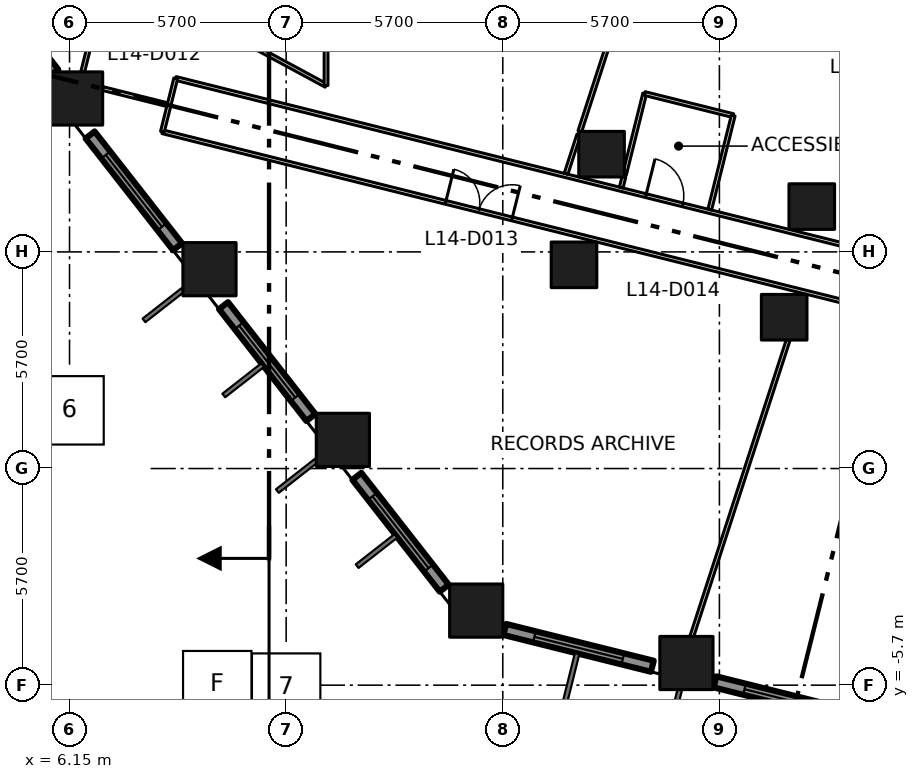
"""IFC4 building model, lengths in metres.
Left out: names, types, materials, properties, quantities, classifications, styles, units other than length and angle.
Written with IfcOpenShell. Run it as: python <this file> out.ifc"""

import sys

from ifc_helpers import new_model, si_unit, direction, frame, frame_2d, origin, origin_2d, place, context, subcontext, project, spatial, rectangle, extrude, element, fill, save


model = new_model("IFC4")
c1 = context("Model", 3, precision=1e-05, world=origin(), true_north=direction((0.0, 1.0)))
c2 = subcontext(c1, "Body", "Model", "MODEL_VIEW")
j1 = project(units=[si_unit("LENGTHUNIT", "METRE"), si_unit("PLANEANGLEUNIT", "RADIAN")], contexts=[c1])
p1 = place(None, origin())
s1 = spatial("IfcSite", under=j1, at=p1, CompositionType="ELEMENT")
p2 = place(p1, origin())
s2 = spatial("IfcBuilding", under=s1, at=p2, CompositionType="ELEMENT")
p3 = place(p2, frame((0.0, 0.0, 66.6)))
s3 = spatial("IfcBuildingStorey", under=s2, at=p3, CompositionType="ELEMENT", Elevation=66.6)
for number, where, z_axis, x_axis in (
    (1, (16.851, -3.738, 0.0), (0.0, 0.0, 1.0), (1.0, 0.0, 0.0)),
    (2, (13.342, 0.754, 0.0), (0.0, 0.0, 1.0), (1.0, 0.0, 0.0)),
    (3, (9.833, 5.245, 0.0), (0.0, 0.0, 1.0), (1.0, 0.0, 0.0)),
    (4, (6.323, 9.737, 0.0), (0.0, 0.0, 1.0), (1.0, 0.0, 0.0)),
    (5, (22.382, -5.117, 0.0), (0.0, 0.0, 1.0), (1.0, 0.0, 0.0)),
):
    element("IfcColumn", number, at=place(p3, frame(where, z_axis=z_axis, x_axis=x_axis)), inside=s3, PredefinedType="COLUMN", context=c2, shape_type="SweptSolid", body=[
        extrude(rectangle(XDim=1.4, YDim=1.4, at=origin_2d()), origin(), (0.0, 0.0, 1.0), 4.2),
    ])
for number, where, z_axis, x_axis in (
    (6, (19.424, 5.36, 0.0), (0.0, 0.0, 1.0), (1.0, 0.0, 0.0)),
    (7, (24.954, 3.981, 0.0), (0.0, 0.0, 1.0), (1.0, 0.0, 0.0)),
    (8, (20.149, 8.271, 0.0), (0.0, 0.0, 1.0), (1.0, 0.0, 0.0)),
    (9, (25.68, 6.892, 0.0), (0.0, 0.0, 1.0), (1.0, 0.0, 0.0)),
):
    element("IfcColumn", number, at=place(p3, frame(where, z_axis=z_axis, x_axis=x_axis)), inside=s3, PredefinedType="COLUMN", context=c2, shape_type="SweptSolid", body=[
        extrude(rectangle(XDim=1.2, YDim=1.2, at=origin_2d()), origin(), (0.0, 0.0, 1.0), 4.2),
    ])
p4 = place(p3, frame((3.361, 13.529, 0.0), z_axis=(0.0, 0.0, 1.0), x_axis=(0.615507574125, -0.788130970204, 0.0)))
e10 = element("IfcWall", 10, at=p4, inside=s3, PredefinedType="SOLIDWALL", context=c2, shape_type="SweptSolid", body=[
    extrude(rectangle(XDim=3.923, YDim=0.2, at=frame_2d((1.962, 0.0))), origin(), (0.0, 0.0, 1.0), 3.1),
])
p5 = place(p4, frame((1.061, 0.0, 0.0)))
e11 = element("IfcOpeningElement", 11, at=p5, cuts=e10, PredefinedType="OPENING", context=c2, shape_type="SweptSolid", body=[
    extrude(rectangle(XDim=1.8, YDim=2.9, at=frame_2d((0.9, 1.45))), frame((0.0, 0.11, 0.0), z_axis=(0.0, -1.0, 0.0), x_axis=(1.0, 0.0, 0.0)), (0.0, 0.0, 1.0), 0.22),
])
p6 = place(p3, frame((6.692, 8.778, 0.0), z_axis=(0.0, 0.0, 1.0), x_axis=(0.615767067156, -0.787928244833, 0.0)))
e12 = element("IfcWall", 12, at=p6, inside=s3, PredefinedType="SOLIDWALL", context=c2, shape_type="SweptSolid", body=[
    extrude(rectangle(XDim=3.735, YDim=0.3, at=frame_2d((1.868, 0.0))), origin(), (0.0, 0.0, 1.0), 3.1),
])
p7 = place(p6, frame((0.668, 0.0, 0.8)))
e13 = element("IfcOpeningElement", 13, at=p7, cuts=e12, PredefinedType="OPENING", context=c2, shape_type="SweptSolid", body=[
    extrude(rectangle(XDim=2.4, YDim=2.1, at=frame_2d((1.2, 1.05))), frame((0.0, 0.16, 0.0), z_axis=(0.0, -1.0, 0.0), x_axis=(1.0, 0.0, 0.0)), (0.0, 0.0, 1.0), 0.32),
])
p8 = place(p3, frame((10.202, 4.286, 0.0), z_axis=(0.0, 0.0, 1.0), x_axis=(0.615636430057, -0.788030320474, 0.0)))
e14 = element("IfcWall", 14, at=p8, inside=s3, PredefinedType="SOLIDWALL", context=c2, shape_type="SweptSolid", body=[
    extrude(rectangle(XDim=3.734, YDim=0.3, at=frame_2d((1.867, 0.0))), origin(), (0.0, 0.0, 1.0), 3.1),
])
p9 = place(p8, frame((0.667, 0.0, 0.8)))
e15 = element("IfcOpeningElement", 15, at=p9, cuts=e14, PredefinedType="OPENING", context=c2, shape_type="SweptSolid", body=[
    extrude(rectangle(XDim=2.4, YDim=2.1, at=frame_2d((1.2, 1.05))), frame((0.0, 0.16, 0.0), z_axis=(0.0, -1.0, 0.0), x_axis=(1.0, 0.0, 0.0)), (0.0, 0.0, 1.0), 0.32),
])
p10 = place(p3, frame((13.71, -0.205, 0.0), z_axis=(0.0, 0.0, 1.0), x_axis=(0.615798780214, -0.787903460004, 0.0)))
e16 = element("IfcWall", 16, at=p10, inside=s3, PredefinedType="SOLIDWALL", context=c2, shape_type="SweptSolid", body=[
    extrude(rectangle(XDim=3.735, YDim=0.3, at=frame_2d((1.868, 0.0))), origin(), (0.0, 0.0, 1.0), 3.1),
])
p11 = place(p10, frame((0.667, 0.0, 0.8)))
e17 = element("IfcOpeningElement", 17, at=p11, cuts=e16, PredefinedType="OPENING", context=c2, shape_type="SweptSolid", body=[
    extrude(rectangle(XDim=2.4, YDim=2.1, at=frame_2d((1.2, 1.05))), frame((0.0, 0.16, 0.0), z_axis=(0.0, -1.0, 0.0), x_axis=(1.0, 0.0, 0.0)), (0.0, 0.0, 1.0), 0.32),
])
p12 = place(p3, frame((17.602, -4.234, 0.0), z_axis=(0.0, 0.0, 1.0), x_axis=(0.970260773365, -0.242062040951, 0.0)))
e18 = element("IfcWall", 18, at=p12, inside=s3, PredefinedType="SOLIDWALL", context=c2, shape_type="SweptSolid", body=[
    extrude(rectangle(XDim=4.003, YDim=0.3, at=frame_2d((2.001, 0.0))), origin(), (0.0, 0.0, 1.0), 3.1),
])
p13 = place(p12, frame((0.802, 0.0, 0.8)))
e19 = element("IfcOpeningElement", 19, at=p13, cuts=e18, PredefinedType="OPENING", context=c2, shape_type="SweptSolid", body=[
    extrude(rectangle(XDim=2.4, YDim=2.1, at=frame_2d((1.2, 1.05))), frame((0.0, 0.16, 0.0), z_axis=(0.0, -1.0, 0.0), x_axis=(1.0, 0.0, 0.0)), (0.0, 0.0, 1.0), 0.32),
])
p14 = place(p3, frame((23.133, -5.613, 0.0), z_axis=(0.0, 0.0, 1.0), x_axis=(0.970303772127, -0.241889623168, 0.0)))
e20 = element("IfcWall", 20, at=p14, inside=s3, PredefinedType="SOLIDWALL", context=c2, shape_type="SweptSolid", body=[
    extrude(rectangle(XDim=4.002, YDim=0.3, at=frame_2d((2.001, 0.0))), origin(), (0.0, 0.0, 1.0), 3.1),
])
p15 = place(p14, frame((0.801, 0.0, 0.8)))
e21 = element("IfcOpeningElement", 21, at=p15, cuts=e20, PredefinedType="OPENING", context=c2, shape_type="SweptSolid", body=[
    extrude(rectangle(XDim=2.4, YDim=2.1, at=frame_2d((1.2, 1.05))), frame((0.0, 0.16, 0.0), z_axis=(0.0, -1.0, 0.0), x_axis=(1.0, 0.0, 0.0)), (0.0, 0.0, 1.0), 0.32),
])
p16 = place(p3, frame((8.594, 8.862, 0.0), z_axis=(0.0, 0.0, 1.0), x_axis=(0.970293392615, -0.241931255211, 0.0)))
e22 = element("IfcWall", 22, at=p16, inside=s3, PredefinedType="PARTITIONING", context=c2, shape_type="SweptSolid", body=[
    extrude(rectangle(XDim=67.775, YDim=0.1, at=frame_2d((33.888, 0.0))), origin(), (0.0, 0.0, 1.0), 3.9),
])
p17 = place(p16, frame((41.271, 0.0, 0.0)))
e23 = element("IfcOpeningElement", 23, at=p17, cuts=e22, PredefinedType="OPENING", context=c2, shape_type="SweptSolid", body=[
    extrude(rectangle(XDim=1.8, YDim=2.1, at=frame_2d((0.9, 1.05))), frame((0.0, 0.06, 0.0), z_axis=(0.0, -1.0, 0.0), x_axis=(1.0, 0.0, 0.0)), (0.0, 0.0, 1.0), 0.12),
])
p18 = place(p16, frame((48.571, 0.0, 0.0)))
e24 = element("IfcOpeningElement", 24, at=p18, cuts=e22, PredefinedType="OPENING", context=c2, shape_type="SweptSolid", body=[
    extrude(rectangle(XDim=1.0, YDim=2.1, at=frame_2d((0.5, 1.05))), frame((0.0, 0.06, 0.0), z_axis=(0.0, -1.0, 0.0), x_axis=(1.0, 0.0, 0.0)), (0.0, 0.0, 1.0), 0.12),
])
p19 = place(p16, frame((59.471, 0.0, 0.0)))
e25 = element("IfcOpeningElement", 25, at=p19, cuts=e22, PredefinedType="OPENING", context=c2, shape_type="SweptSolid", body=[
    extrude(rectangle(XDim=1.0, YDim=2.1, at=frame_2d((0.5, 1.05))), frame((0.0, 0.06, 0.0), z_axis=(0.0, -1.0, 0.0), x_axis=(1.0, 0.0, 0.0)), (0.0, 0.0, 1.0), 0.12),
])
p20 = place(p16, frame((20.171, 0.0, 0.0)))
e26 = element("IfcOpeningElement", 26, at=p20, cuts=e22, PredefinedType="OPENING", context=c2, shape_type="SweptSolid", body=[
    extrude(rectangle(XDim=1.0, YDim=2.1, at=frame_2d((0.5, 1.05))), frame((0.0, 0.06, 0.0), z_axis=(0.0, -1.0, 0.0), x_axis=(1.0, 0.0, 0.0)), (0.0, 0.0, 1.0), 0.12),
])
p21 = place(p16, frame((25.271, 0.0, 0.0)))
e27 = element("IfcOpeningElement", 27, at=p21, cuts=e22, PredefinedType="OPENING", context=c2, shape_type="SweptSolid", body=[
    extrude(rectangle(XDim=1.8, YDim=2.1, at=frame_2d((0.9, 1.05))), frame((0.0, 0.06, 0.0), z_axis=(0.0, -1.0, 0.0), x_axis=(1.0, 0.0, 0.0)), (0.0, 0.0, 1.0), 0.12),
])
p22 = place(p16, frame((7.68, 0.0, 0.0)))
e28 = element("IfcOpeningElement", 28, at=p22, cuts=e22, PredefinedType="OPENING", context=c2, shape_type="SweptSolid", body=[
    extrude(rectangle(XDim=1.8, YDim=2.1, at=frame_2d((0.9, 1.05))), frame((0.0, 0.06, 0.0), z_axis=(0.0, -1.0, 0.0), x_axis=(1.0, 0.0, 0.0)), (0.0, 0.0, 1.0), 0.12),
])
p23 = place(p3, frame((8.944, 10.264, 0.0), z_axis=(0.0, 0.0, 1.0), x_axis=(0.970300504447, -0.241902730595, 0.0)))
e29 = element("IfcWall", 29, at=p23, inside=s3, PredefinedType="PARTITIONING", context=c2, shape_type="SweptSolid", body=[
    extrude(rectangle(XDim=19.879, YDim=0.1, at=frame_2d((9.939, 0.0))), origin(), (0.0, 0.0, 1.0), 3.9),
])
p24 = place(p23, frame((12.749, 0.0, 0.0)))
e30 = element("IfcOpeningElement", 30, at=p24, cuts=e29, PredefinedType="OPENING", context=c2, shape_type="SweptSolid", body=[
    extrude(rectangle(XDim=1.0, YDim=2.1, at=frame_2d((0.5, 1.05))), frame((0.0, 0.06, 0.0), z_axis=(0.0, -1.0, 0.0), x_axis=(1.0, 0.0, 0.0)), (0.0, 0.0, 1.0), 0.12),
])
p25 = place(p3, frame((8.944, 10.264, 0.0), z_axis=(0.0, 0.0, 1.0), x_axis=(-0.242297077633, -0.970202105837, 0.0)))
e31 = element("IfcWall", 31, at=p25, inside=s3, PredefinedType="PARTITIONING", context=c2, shape_type="SweptSolid", body=[
    extrude(rectangle(XDim=1.445, YDim=0.1, at=frame_2d((0.722, 0.0))), origin(), (0.0, 0.0, 1.0), 3.9),
])
p26 = place(p3, frame((9.9, 11.7, 0.0), z_axis=(0.0, 0.0, 1.0), x_axis=(0.87965147249, -0.475618846291, 0.0)))
e32 = element("IfcWall", 32, at=p26, inside=s3, PredefinedType="PARTITIONING", context=c2, shape_type="SweptSolid", body=[
    extrude(rectangle(XDim=3.41, YDim=0.1, at=frame_2d((1.705, 0.0))), origin(), (0.0, 0.0, 1.0), 3.9),
])
p27 = place(p3, frame((12.9, 10.078, 0.0), z_axis=(0.0, 0.0, 1.0), x_axis=(0.0, 1.0, 0.0)))
e33 = element("IfcWall", 33, at=p27, inside=s3, PredefinedType="PARTITIONING", context=c2, shape_type="SweptSolid", body=[
    extrude(rectangle(XDim=4.022, YDim=0.1, at=frame_2d((2.011, 0.0))), origin(), (0.0, 0.0, 1.0), 3.9),
])
p28 = place(p3, frame((6.797, 11.638, 0.0), z_axis=(0.0, 0.0, 1.0), x_axis=(-0.242396400943, -0.970177295555, 0.0)))
e34 = element("IfcWall", 34, at=p28, inside=s3, PredefinedType="PARTITIONING", context=c2, shape_type="SweptSolid", body=[
    extrude(rectangle(XDim=1.238, YDim=0.1, at=frame_2d((0.619, 0.0))), origin(), (0.0, 0.0, 1.0), 3.9),
])
p29 = place(p3, frame((8.72, 9.574, 0.0), z_axis=(0.0, 0.0, 1.0), x_axis=(-0.97016712555, 0.242437102155, 0.0)))
e35 = element("IfcWall", 35, at=p29, inside=s3, PredefinedType="PARTITIONING", context=c2, shape_type="SweptSolid", body=[
    extrude(rectangle(XDim=1.749, YDim=0.1, at=frame_2d((0.875, 0.0))), origin(), (0.0, 0.0, 1.0), 3.9),
])
p30 = place(p3, frame((19.216, 7.758, 0.0), z_axis=(0.0, 0.0, 1.0), x_axis=(0.308748247722, 0.9511437954, 0.0)))
e36 = element("IfcWall", 36, at=p30, inside=s3, PredefinedType="PARTITIONING", context=c2, shape_type="SweptSolid", body=[
    extrude(rectangle(XDim=1.079, YDim=0.1, at=frame_2d((0.539, 0.0))), origin(), (0.0, 0.0, 1.0), 3.9),
])
p31 = place(p3, frame((19.577, 8.871, 0.0), z_axis=(0.0, 0.0, 1.0), x_axis=(0.309011770838, 0.951058213509, 0.0)))
e37 = element("IfcWall", 37, at=p31, inside=s3, PredefinedType="PARTITIONING", context=c2, shape_type="SweptSolid", body=[
    extrude(rectangle(XDim=5.498, YDim=0.1, at=frame_2d((2.749, 0.0))), origin(), (0.0, 0.0, 1.0), 3.9),
])
p32 = place(p3, frame((20.667, 7.393, 0.0), z_axis=(0.0, 0.0, 1.0), x_axis=(0.241331539526, 0.970442727846, 0.0)))
e38 = element("IfcWall", 38, at=p32, inside=s3, PredefinedType="PARTITIONING", context=c2, shape_type="SweptSolid", body=[
    extrude(rectangle(XDim=0.286, YDim=0.1, at=frame_2d((0.143, 0.0))), origin(), (0.0, 0.0, 1.0), 3.9),
])
p33 = place(p3, frame((20.749, 7.722, 0.0), z_axis=(0.0, 0.0, 1.0), x_axis=(0.241963917433, 0.97028524809, 0.0)))
e39 = element("IfcWall", 39, at=p33, inside=s3, PredefinedType="PARTITIONING", context=c2, shape_type="SweptSolid", body=[
    extrude(rectangle(XDim=2.211, YDim=0.1, at=frame_2d((1.105, 0.0))), origin(), (0.0, 0.0, 1.0), 3.9),
])
p34 = place(p3, frame((21.284, 9.867, 0.0), z_axis=(0.0, 0.0, 1.0), x_axis=(0.970262034576, -0.242056985565, 0.0)))
e40 = element("IfcWall", 40, at=p34, inside=s3, PredefinedType="PARTITIONING", context=c2, shape_type="SweptSolid", body=[
    extrude(rectangle(XDim=2.4, YDim=0.1, at=frame_2d((1.2, 0.0))), origin(), (0.0, 0.0, 1.0), 3.9),
])
p35 = place(p3, frame((22.524, -4.417, 0.0), z_axis=(0.0, 0.0, 1.0), x_axis=(0.309171572002, 0.951006277091, 0.0)))
e41 = element("IfcWall", 41, at=p35, inside=s3, PredefinedType="PARTITIONING", context=c2, shape_type="SweptSolid", body=[
    extrude(rectangle(XDim=8.2, YDim=0.1, at=frame_2d((4.1, 0.0))), origin(), (0.0, 0.0, 1.0), 3.9),
])
p36 = place(p3, frame((23.613, 9.286, 0.0), z_axis=(0.0, 0.0, 1.0), x_axis=(-0.241972320765, -0.970283152478, 0.0)))
e42 = element("IfcWall", 42, at=p36, inside=s3, PredefinedType="PARTITIONING", context=c2, shape_type="SweptSolid", body=[
    extrude(rectangle(XDim=2.55, YDim=0.1, at=frame_2d((1.275, 0.0))), origin(), (0.0, 0.0, 1.0), 3.9),
])
p37 = place(p7, origin())
e43 = element("IfcWindow", 43, at=p37, inside=s3, PartitioningType="DOUBLE_PANEL_VERTICAL", PredefinedType="WINDOW", context=c2, shape_type="SweptSolid", body=[
    extrude(rectangle(XDim=2.4, YDim=2.1, at=frame_2d((1.2, 1.05))), frame((0.0, 0.03, 0.0), z_axis=(0.0, -1.0, 0.0), x_axis=(1.0, 0.0, 0.0)), (0.0, 0.0, 1.0), 0.06),
])
fill(e13, e43)
p38 = place(p9, origin())
e44 = element("IfcWindow", 44, at=p38, inside=s3, PartitioningType="DOUBLE_PANEL_VERTICAL", PredefinedType="WINDOW", context=c2, shape_type="SweptSolid", body=[
    extrude(rectangle(XDim=2.4, YDim=2.1, at=frame_2d((1.2, 1.05))), frame((0.0, 0.03, 0.0), z_axis=(0.0, -1.0, 0.0), x_axis=(1.0, 0.0, 0.0)), (0.0, 0.0, 1.0), 0.06),
])
fill(e15, e44)
p39 = place(p11, origin())
e45 = element("IfcWindow", 45, at=p39, inside=s3, PartitioningType="DOUBLE_PANEL_VERTICAL", PredefinedType="WINDOW", context=c2, shape_type="SweptSolid", body=[
    extrude(rectangle(XDim=2.4, YDim=2.1, at=frame_2d((1.2, 1.05))), frame((0.0, 0.03, 0.0), z_axis=(0.0, -1.0, 0.0), x_axis=(1.0, 0.0, 0.0)), (0.0, 0.0, 1.0), 0.06),
])
fill(e17, e45)
p40 = place(p13, origin())
e46 = element("IfcWindow", 46, at=p40, inside=s3, PartitioningType="DOUBLE_PANEL_VERTICAL", PredefinedType="WINDOW", context=c2, shape_type="SweptSolid", body=[
    extrude(rectangle(XDim=2.4, YDim=2.1, at=frame_2d((1.2, 1.05))), frame((0.0, 0.03, 0.0), z_axis=(0.0, -1.0, 0.0), x_axis=(1.0, 0.0, 0.0)), (0.0, 0.0, 1.0), 0.06),
])
fill(e19, e46)
p41 = place(p15, origin())
e47 = element("IfcWindow", 47, at=p41, inside=s3, PartitioningType="DOUBLE_PANEL_VERTICAL", PredefinedType="WINDOW", context=c2, shape_type="SweptSolid", body=[
    extrude(rectangle(XDim=2.4, YDim=2.1, at=frame_2d((1.2, 1.05))), frame((0.0, 0.03, 0.0), z_axis=(0.0, -1.0, 0.0), x_axis=(1.0, 0.0, 0.0)), (0.0, 0.0, 1.0), 0.06),
])
fill(e21, e47)
p42 = place(p22, origin())
e48 = element("IfcDoor", 48, at=p42, inside=s3, OperationType="DOUBLE_DOOR_SINGLE_SWING", PredefinedType="DOOR", context=c2, shape_type="SweptSolid", body=[
    extrude(rectangle(XDim=1.8, YDim=2.1, at=frame_2d((0.9, 1.05))), frame((0.0, 0.025, 0.0), z_axis=(0.0, -1.0, 0.0), x_axis=(1.0, 0.0, 0.0)), (0.0, 0.0, 1.0), 0.05),
])
fill(e28, e48)
p43 = place(p24, origin())
e49 = element("IfcDoor", 49, at=p43, inside=s3, OperationType="SINGLE_SWING_LEFT", PredefinedType="DOOR", context=c2, shape_type="SweptSolid", body=[
    extrude(rectangle(XDim=1.0, YDim=2.1, at=frame_2d((0.5, 1.05))), frame((0.0, 0.025, 0.0), z_axis=(0.0, -1.0, 0.0), x_axis=(1.0, 0.0, 0.0)), (0.0, 0.0, 1.0), 0.05),
])
fill(e30, e49)
save(model, sys.argv[1])
